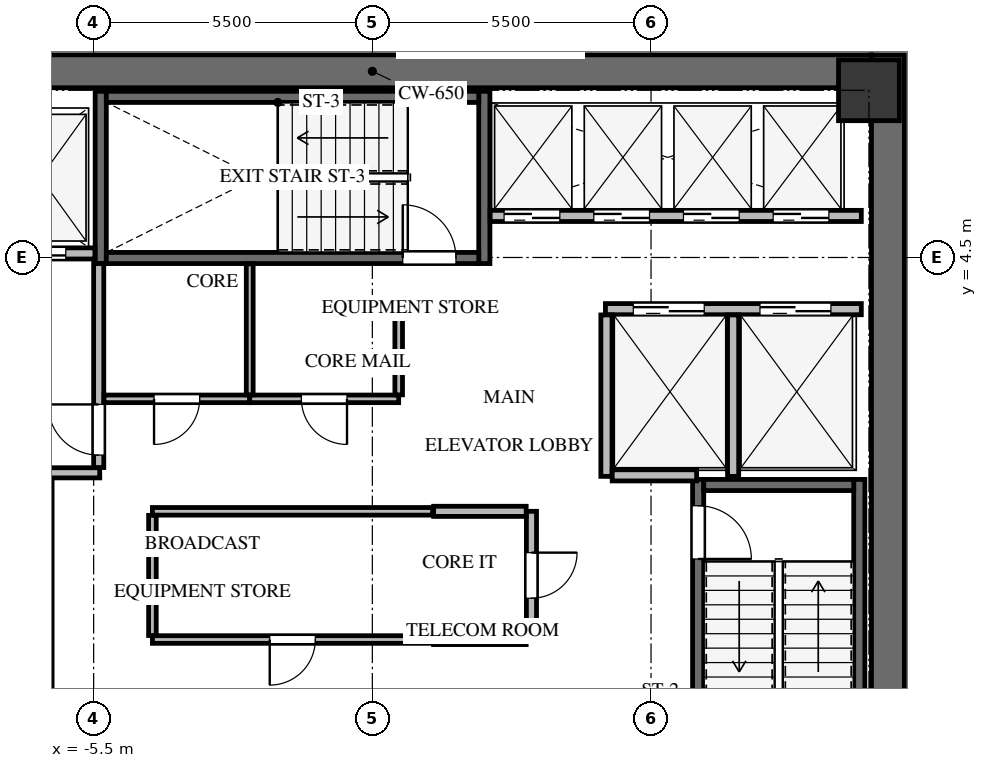
"""IFC4 building model, lengths in metres.
Left out: names, types, materials, properties, quantities, classifications, styles, units other than length and angle.
Written with IfcOpenShell. Run it as: python <this file> out.ifc"""

import sys

from ifc_helpers import new_model, si_unit, direction, frame, frame_2d, origin, origin_2d, place, context, subcontext, project, spatial, rectangle, extrude, source, transform, mapped, element, fill, save


model = new_model("IFC4")
c1 = context("Model", 3, precision=1e-05, world=origin(), true_north=direction((0.0, 1.0)))
c2 = subcontext(c1, "Body", "Model", "MODEL_VIEW")
j1 = project(units=[si_unit("LENGTHUNIT", "METRE"), si_unit("PLANEANGLEUNIT", "RADIAN")], contexts=[c1])
p1 = place(None, origin())
s1 = spatial("IfcSite", under=j1, at=p1, CompositionType="ELEMENT")
p2 = place(p1, origin())
s2 = spatial("IfcBuilding", under=s1, at=p2, CompositionType="ELEMENT")
p3 = place(p2, frame((0.0, 0.0, 187.0)))
s3 = spatial("IfcBuildingStorey", under=s2, at=p3, CompositionType="ELEMENT", Elevation=187.0)
p4 = place(p3, frame((10.175, -8.5, 0.0), z_axis=(0.0, 0.0, 1.0), x_axis=(0.0, 1.0, 0.0)))
e1 = element("IfcWall", 1, at=p4, inside=s3, PredefinedType="SHEAR", context=c2, shape_type="SweptSolid", body=[
    extrude(rectangle(XDim=17.0, YDim=0.65, at=frame_2d((8.5, 0.0))), origin(), (0.0, 0.0, 1.0), 3.3),
])
p5 = place(p3, frame((-9.85, 8.175, 0.0), z_axis=(0.0, 0.0, 1.0), x_axis=(1.0, 0.0, 0.0)))
e2 = element("IfcWall", 2, at=p5, inside=s3, PredefinedType="SHEAR", context=c2, shape_type="SweptSolid", body=[
    extrude(rectangle(XDim=19.7, YDim=0.65, at=frame_2d((9.85, 0.0))), origin(), (0.0, 0.0, 1.0), 3.3),
])
p6 = place(p3, frame((-6.43, -7.77, -0.24), z_axis=(0.0, 0.0, 1.0), x_axis=(0.0, 1.0, 0.0)))
e3 = element("IfcWall", 3, at=p6, inside=s3, PredefinedType="SHEAR", context=c2, shape_type="SweptSolid", body=[
    extrude(rectangle(XDim=7.89, YDim=0.22, at=frame_2d((3.945, 0.0))), origin(), (0.0, 0.0, 1.0), 3.3),
])
p7 = place(p6, frame((6.32, 0.0, 0.0)))
e4 = element("IfcOpeningElement", 4, at=p7, cuts=e3, PredefinedType="OPENING", context=c2, shape_type="SweptSolid", body=[
    extrude(rectangle(XDim=1.05, YDim=2.15, at=frame_2d((0.525, 1.075))), frame((0.0, 0.12, 0.0), z_axis=(0.0, -1.0, 0.0), x_axis=(1.0, 0.0, 0.0)), (0.0, 0.0, 1.0), 0.24),
])
p8 = place(p3, frame((9.61, -7.77, -0.24), z_axis=(0.0, 0.0, 1.0), x_axis=(0.0, 1.0, 0.0)))
e5 = element("IfcWall", 5, at=p8, inside=s3, PredefinedType="SHEAR", context=c2, shape_type="SweptSolid", body=[
    extrude(rectangle(XDim=7.89, YDim=0.22, at=frame_2d((3.945, 0.0))), origin(), (0.0, 0.0, 1.0), 3.3),
])
p9 = place(p3, frame((6.43, 0.12, -0.24), z_axis=(0.0, 0.0, 1.0), x_axis=(0.0, -1.0, 0.0)))
e6 = element("IfcWall", 6, at=p9, inside=s3, PredefinedType="SHEAR", context=c2, shape_type="SweptSolid", body=[
    extrude(rectangle(XDim=7.89, YDim=0.22, at=frame_2d((3.945, 0.0))), origin(), (0.0, 0.0, 1.0), 3.3),
])
p10 = place(p9, frame((0.52, 0.0, 0.0)))
e7 = element("IfcOpeningElement", 7, at=p10, cuts=e6, PredefinedType="OPENING", context=c2, shape_type="SweptSolid", body=[
    extrude(rectangle(XDim=1.05, YDim=2.15, at=frame_2d((0.525, 1.075))), frame((0.0, 0.12, 0.0), z_axis=(0.0, -1.0, 0.0), x_axis=(1.0, 0.0, 0.0)), (0.0, 0.0, 1.0), 0.24),
])
p11 = place(p3, frame((9.5, 0.01, -0.24), z_axis=(0.0, 0.0, 1.0), x_axis=(-1.0, 0.0, 0.0)))
e8 = element("IfcWall", 8, at=p11, inside=s3, PredefinedType="SHEAR", context=c2, shape_type="SweptSolid", body=[
    extrude(rectangle(XDim=2.96, YDim=0.22, at=frame_2d((1.48, 0.0))), origin(), (0.0, 0.0, 1.0), 3.3),
])
for number, where, z_axis, x_axis in (
    (9, (2.21, 4.38, -0.24), (0.0, 0.0, 1.0), (0.0, 1.0, 0.0)),
    (10, (-5.36, 7.78, -0.24), (0.0, 0.0, 1.0), (0.0, -1.0, 0.0)),
):
    element("IfcWall", number, at=place(p3, frame(where, z_axis=z_axis, x_axis=x_axis)), inside=s3, PredefinedType="SHEAR", context=c2, shape_type="SweptSolid", body=[
        extrude(rectangle(XDim=3.4, YDim=0.22, at=frame_2d((1.7, 0.0))), origin(), (0.0, 0.0, 1.0), 3.3),
    ])
p12 = place(p3, frame((-5.25, 4.49, -0.24), z_axis=(0.0, 0.0, 1.0), x_axis=(1.0, 0.0, 0.0)))
e11 = element("IfcWall", 11, at=p12, inside=s3, PredefinedType="SHEAR", context=c2, shape_type="SweptSolid", body=[
    extrude(rectangle(XDim=7.35, YDim=0.22, at=frame_2d((3.675, 0.0))), origin(), (0.0, 0.0, 1.0), 3.3),
])
p13 = place(p12, frame((5.85, 0.0, 0.0)))
e12 = element("IfcOpeningElement", 12, at=p13, cuts=e11, PredefinedType="OPENING", context=c2, shape_type="SweptSolid", body=[
    extrude(rectangle(XDim=1.05, YDim=2.15, at=frame_2d((0.525, 1.075))), frame((0.0, 0.12, 0.0), z_axis=(0.0, -1.0, 0.0), x_axis=(1.0, 0.0, 0.0)), (0.0, 0.0, 1.0), 0.24),
])
p14 = place(p3, frame((2.1, 7.67, -0.24), z_axis=(0.0, 0.0, 1.0), x_axis=(-1.0, 0.0, 0.0)))
e13 = element("IfcWall", 13, at=p14, inside=s3, PredefinedType="SHEAR", context=c2, shape_type="SweptSolid", body=[
    extrude(rectangle(XDim=7.35, YDim=0.22, at=frame_2d((3.675, 0.0))), origin(), (0.0, 0.0, 1.0), 3.3),
])
m1 = source(origin(), c2, "Body", "SweptSolid", [
    extrude(rectangle(XDim=1.2, YDim=1.2, at=origin_2d()), origin(), (0.0, 0.0, 1.0), 3.3),
])
p15 = place(p3, frame((9.8, 7.8, -0.24), z_axis=(0.0, 0.0, 1.0), x_axis=(1.0, 0.0, 0.0)))
e14 = element("IfcColumn", 14, at=p15, inside=s3, PredefinedType="COLUMN", context=c2, shape_type="MappedRepresentation", body=[
    mapped(m1, transform((0.0, 0.0, 0.0), x_axis=(1.0, 0.0, 0.0), y_axis=(0.0, 1.0, 0.0), z_axis=(0.0, 0.0, 1.0), scale=1.0)),
])
p16 = place(p3, frame((-9.65, 4.58, 0.0), z_axis=(0.0, 0.0, 1.0), x_axis=(1.0, 0.0, 0.0)))
e15 = element("IfcWall", 15, at=p16, inside=s3, PredefinedType="SOLIDWALL", context=c2, shape_type="SweptSolid", body=[
    extrude(rectangle(XDim=4.175, YDim=0.22, at=frame_2d((2.087, 0.0))), origin(), (0.0, 0.0, 1.0), 3.045),
])
p17 = place(p16, frame((0.4, 0.0, 0.0)))
e16 = element("IfcOpeningElement", 16, at=p17, cuts=e15, PredefinedType="OPENING", context=c2, shape_type="SweptSolid", body=[
    extrude(rectangle(XDim=1.2, YDim=2.15, at=frame_2d((0.6, 1.075))), frame((0.0, 0.12, 0.0), z_axis=(0.0, -1.0, 0.0), x_axis=(1.0, 0.0, 0.0)), (0.0, 0.0, 1.0), 0.24),
])
p18 = place(p16, frame((2.4, 0.0, 0.0)))
e17 = element("IfcOpeningElement", 17, at=p18, cuts=e15, PredefinedType="OPENING", context=c2, shape_type="SweptSolid", body=[
    extrude(rectangle(XDim=1.2, YDim=2.15, at=frame_2d((0.6, 1.075))), frame((0.0, 0.12, 0.0), z_axis=(0.0, -1.0, 0.0), x_axis=(1.0, 0.0, 0.0)), (0.0, 0.0, 1.0), 0.24),
])
p19 = place(p3, frame((-9.65, 0.25, 0.0), z_axis=(0.0, 0.0, 1.0), x_axis=(1.0, 0.0, 0.0)))
e18 = element("IfcWall", 18, at=p19, inside=s3, PredefinedType="SOLIDWALL", context=c2, shape_type="SweptSolid", body=[
    extrude(rectangle(XDim=4.27, YDim=0.2, at=frame_2d((2.135, 0.0))), origin(), (0.0, 0.0, 1.0), 3.045),
])
p20 = place(p3, frame((-5.4, 0.354, 0.0), z_axis=(0.0, 0.0, 1.0), x_axis=(0.0, 1.0, 0.0)))
e19 = element("IfcWall", 19, at=p20, inside=s3, PredefinedType="SOLIDWALL", context=c2, shape_type="SweptSolid", body=[
    extrude(rectangle(XDim=4.026, YDim=0.2, at=frame_2d((2.013, 0.0))), origin(), (0.0, 0.0, 1.0), 3.045),
])
p21 = place(p20, frame((0.246, 0.0, 0.0)))
e20 = element("IfcOpeningElement", 20, at=p21, cuts=e19, PredefinedType="OPENING", context=c2, shape_type="SweptSolid", body=[
    extrude(rectangle(XDim=1.0, YDim=2.15, at=frame_2d((0.5, 1.075))), frame((0.0, 0.11, 0.0), z_axis=(0.0, -1.0, 0.0), x_axis=(1.0, 0.0, 0.0)), (0.0, 0.0, 1.0), 0.22),
])
p22 = place(p3, frame((4.6, 3.48, 0.0), z_axis=(0.0, 0.0, 1.0), x_axis=(1.0, 0.0, 0.0)))
e21 = element("IfcWall", 21, at=p22, inside=s3, PredefinedType="SOLIDWALL", context=c2, shape_type="SweptSolid", body=[
    extrude(rectangle(XDim=5.05, YDim=0.22, at=frame_2d((2.525, 0.0))), origin(), (0.0, 0.0, 1.0), 3.045),
])
p23 = place(p22, frame((0.55, 0.0, 0.0)))
e22 = element("IfcOpeningElement", 22, at=p23, cuts=e21, PredefinedType="OPENING", context=c2, shape_type="SweptSolid", body=[
    extrude(rectangle(XDim=1.4, YDim=2.15, at=frame_2d((0.7, 1.075))), frame((0.0, 0.12, 0.0), z_axis=(0.0, -1.0, 0.0), x_axis=(1.0, 0.0, 0.0)), (0.0, 0.0, 1.0), 0.24),
])
p24 = place(p22, frame((3.05, 0.0, 0.0)))
e23 = element("IfcOpeningElement", 23, at=p24, cuts=e21, PredefinedType="OPENING", context=c2, shape_type="SweptSolid", body=[
    extrude(rectangle(XDim=1.4, YDim=2.15, at=frame_2d((0.7, 1.075))), frame((0.0, 0.12, 0.0), z_axis=(0.0, -1.0, 0.0), x_axis=(1.0, 0.0, 0.0)), (0.0, 0.0, 1.0), 0.24),
])
for number, where, z_axis, x_axis in (
    (24, (4.62, 0.18, 0.0), (0.0, 0.0, 1.0), (0.0, 1.0, 0.0)),
    (25, (7.12, 0.18, 0.0), (0.0, 0.0, 1.0), (0.0, 1.0, 0.0)),
):
    element("IfcWall", number, at=place(p3, frame(where, z_axis=z_axis, x_axis=x_axis)), inside=s3, PredefinedType="SOLIDWALL", context=c2, shape_type="SweptSolid", body=[
        extrude(rectangle(XDim=3.186, YDim=0.22, at=frame_2d((1.593, 0.0))), origin(), (0.0, 0.0, 1.0), 3.045),
    ])
p25 = place(p3, frame((4.734, 0.2, 0.0), z_axis=(0.0, 0.0, 1.0), x_axis=(1.0, 0.0, 0.0)))
e26 = element("IfcWall", 26, at=p25, inside=s3, PredefinedType="SOLIDWALL", context=c2, shape_type="SweptSolid", body=[
    extrude(rectangle(XDim=1.666, YDim=0.22, at=frame_2d((0.833, 0.0))), origin(), (0.0, 0.0, 1.0), 3.045),
])
p26 = place(p3, frame((2.325, 5.32, 0.0), z_axis=(0.0, 0.0, 1.0), x_axis=(1.0, 0.0, 0.0)))
e27 = element("IfcWall", 27, at=p26, inside=s3, PredefinedType="SOLIDWALL", context=c2, shape_type="SweptSolid", body=[
    extrude(rectangle(XDim=7.325, YDim=0.22, at=frame_2d((3.663, 0.0))), origin(), (0.0, 0.0, 1.0), 3.045),
])
p27 = place(p26, frame((0.275, 0.0, 0.0)))
e28 = element("IfcOpeningElement", 28, at=p27, cuts=e27, PredefinedType="OPENING", context=c2, shape_type="SweptSolid", body=[
    extrude(rectangle(XDim=1.1, YDim=2.15, at=frame_2d((0.55, 1.075))), frame((0.0, 0.12, 0.0), z_axis=(0.0, -1.0, 0.0), x_axis=(1.0, 0.0, 0.0)), (0.0, 0.0, 1.0), 0.24),
])
p28 = place(p26, frame((2.045, 0.0, 0.0)))
e29 = element("IfcOpeningElement", 29, at=p28, cuts=e27, PredefinedType="OPENING", context=c2, shape_type="SweptSolid", body=[
    extrude(rectangle(XDim=1.1, YDim=2.15, at=frame_2d((0.55, 1.075))), frame((0.0, 0.12, 0.0), z_axis=(0.0, -1.0, 0.0), x_axis=(1.0, 0.0, 0.0)), (0.0, 0.0, 1.0), 0.24),
])
p29 = place(p26, frame((3.815, 0.0, 0.0)))
e30 = element("IfcOpeningElement", 30, at=p29, cuts=e27, PredefinedType="OPENING", context=c2, shape_type="SweptSolid", body=[
    extrude(rectangle(XDim=1.1, YDim=2.15, at=frame_2d((0.55, 1.075))), frame((0.0, 0.12, 0.0), z_axis=(0.0, -1.0, 0.0), x_axis=(1.0, 0.0, 0.0)), (0.0, 0.0, 1.0), 0.24),
])
p30 = place(p26, frame((5.585, 0.0, 0.0)))
e31 = element("IfcOpeningElement", 31, at=p30, cuts=e27, PredefinedType="OPENING", context=c2, shape_type="SweptSolid", body=[
    extrude(rectangle(XDim=1.1, YDim=2.15, at=frame_2d((0.55, 1.075))), frame((0.0, 0.12, 0.0), z_axis=(0.0, -1.0, 0.0), x_axis=(1.0, 0.0, 0.0)), (0.0, 0.0, 1.0), 0.24),
])
p31 = place(p3, frame((1.19, -3.04, 0.0), z_axis=(0.0, 0.0, 1.0), x_axis=(-1.0, 0.0, 0.0)))
e32 = element("IfcWall", 32, at=p31, inside=s3, PredefinedType="PARTITIONING", context=c2, shape_type="SweptSolid", body=[
    extrude(rectangle(XDim=5.53, YDim=0.15, at=frame_2d((2.765, 0.0))), origin(), (0.0, 0.0, 1.0), 3.045),
])
p32 = place(p31, frame((2.315, 0.0, 0.0)))
e33 = element("IfcOpeningElement", 33, at=p32, cuts=e32, PredefinedType="OPENING", context=c2, shape_type="SweptSolid", body=[
    extrude(rectangle(XDim=0.9, YDim=2.05, at=frame_2d((0.45, 1.025))), frame((0.0, 0.085, 0.0), z_axis=(0.0, -1.0, 0.0), x_axis=(1.0, 0.0, 0.0)), (0.0, 0.0, 1.0), 0.17),
])
p33 = place(p3, frame((-4.34, -0.51, 0.0), z_axis=(0.0, 0.0, 1.0), x_axis=(1.0, 0.0, 0.0)))
e34 = element("IfcWall", 34, at=p33, inside=s3, PredefinedType="PARTITIONING", context=c2, shape_type="SweptSolid", body=[
    extrude(rectangle(XDim=5.53, YDim=0.15, at=frame_2d((2.765, 0.0))), origin(), (0.0, 0.0, 1.0), 3.045),
])
p34 = place(p3, frame((-4.34, -2.961, 0.0), z_axis=(0.0, 0.0, 1.0), x_axis=(0.0, 1.0, 0.0)))
e35 = element("IfcWall", 35, at=p34, inside=s3, PredefinedType="PARTITIONING", context=c2, shape_type="SweptSolid", body=[
    extrude(rectangle(XDim=2.372, YDim=0.15, at=frame_2d((1.186, 0.0))), origin(), (0.0, 0.0, 1.0), 3.045),
])
p35 = place(p3, frame((3.14, -0.51, 0.0), z_axis=(0.0, 0.0, 1.0), x_axis=(0.0, -1.0, 0.0)))
e36 = element("IfcWall", 36, at=p35, inside=s3, PredefinedType="SOLIDWALL", context=c2, shape_type="SweptSolid", body=[
    extrude(rectangle(XDim=2.53, YDim=0.2, at=frame_2d((1.265, 0.0))), origin(), (0.0, 0.0, 1.0), 3.045),
])
p36 = place(p35, frame((0.815, 0.0, 0.0)))
e37 = element("IfcOpeningElement", 37, at=p36, cuts=e36, PredefinedType="OPENING", context=c2, shape_type="SweptSolid", body=[
    extrude(rectangle(XDim=0.9, YDim=2.05, at=frame_2d((0.45, 1.025))), frame((0.0, 0.11, 0.0), z_axis=(0.0, -1.0, 0.0), x_axis=(1.0, 0.0, 0.0)), (0.0, 0.0, 1.0), 0.22),
])
for number, where, z_axis, x_axis in (
    (38, (3.036, -3.04, 0.0), (0.0, 0.0, 1.0), (-1.0, 0.0, 0.0)),
    (39, (1.21, -0.51, 0.0), (0.0, 0.0, 1.0), (1.0, 0.0, 0.0)),
):
    element("IfcWall", number, at=place(p3, frame(where, z_axis=z_axis, x_axis=x_axis)), inside=s3, PredefinedType="SOLIDWALL", context=c2, shape_type="SweptSolid", body=[
        extrude(rectangle(XDim=1.826, YDim=0.2, at=frame_2d((0.913, 0.0))), origin(), (0.0, 0.0, 1.0), 3.045),
    ])
p37 = place(p3, frame((-2.42, 1.71, 0.0), z_axis=(0.0, 0.0, 1.0), x_axis=(-1.0, 0.0, 0.0)))
e40 = element("IfcWall", 40, at=p37, inside=s3, PredefinedType="PARTITIONING", context=c2, shape_type="SweptSolid", body=[
    extrude(rectangle(XDim=2.876, YDim=0.15, at=frame_2d((1.438, 0.0))), origin(), (0.0, 0.0, 1.0), 3.045),
])
p38 = place(p37, frame((0.988, 0.0, 0.0)))
e41 = element("IfcOpeningElement", 41, at=p38, cuts=e40, PredefinedType="OPENING", context=c2, shape_type="SweptSolid", body=[
    extrude(rectangle(XDim=0.9, YDim=2.05, at=frame_2d((0.45, 1.025))), frame((0.0, 0.085, 0.0), z_axis=(0.0, -1.0, 0.0), x_axis=(1.0, 0.0, 0.0)), (0.0, 0.0, 1.0), 0.17),
])
p39 = place(p3, frame((0.52, 1.71, 0.0), z_axis=(0.0, 0.0, 1.0), x_axis=(-1.0, 0.0, 0.0)))
e42 = element("IfcWall", 42, at=p39, inside=s3, PredefinedType="PARTITIONING", context=c2, shape_type="SweptSolid", body=[
    extrude(rectangle(XDim=2.94, YDim=0.15, at=frame_2d((1.47, 0.0))), origin(), (0.0, 0.0, 1.0), 3.045),
])
p40 = place(p39, frame((1.02, 0.0, 0.0)))
e43 = element("IfcOpeningElement", 43, at=p40, cuts=e42, PredefinedType="OPENING", context=c2, shape_type="SweptSolid", body=[
    extrude(rectangle(XDim=0.9, YDim=2.05, at=frame_2d((0.45, 1.025))), frame((0.0, 0.085, 0.0), z_axis=(0.0, -1.0, 0.0), x_axis=(1.0, 0.0, 0.0)), (0.0, 0.0, 1.0), 0.17),
])
p41 = place(p3, frame((0.52, 3.3, 0.0), z_axis=(0.0, 0.0, 1.0), x_axis=(0.0, -1.0, 0.0)))
e44 = element("IfcWall", 44, at=p41, inside=s3, PredefinedType="PARTITIONING", context=c2, shape_type="SweptSolid", body=[
    extrude(rectangle(XDim=1.511, YDim=0.15, at=frame_2d((0.755, 0.0))), origin(), (0.0, 0.0, 1.0), 3.045),
])
p42 = place(p3, frame((-2.42, 4.375, 0.0), z_axis=(0.0, 0.0, 1.0), x_axis=(0.0, -1.0, 0.0)))
e45 = element("IfcWall", 45, at=p42, inside=s3, PredefinedType="PARTITIONING", context=c2, shape_type="SweptSolid", body=[
    extrude(rectangle(XDim=2.586, YDim=0.135, at=frame_2d((1.293, 0.0))), origin(), (0.0, 0.0, 1.0), 3.045),
])
m2 = source(origin(), c2, "Body", "SweptSolid", [
    extrude(rectangle(XDim=1.05, YDim=2.15, at=frame_2d((0.525, 1.075))), frame((0.0, 0.025, 0.0), z_axis=(0.0, -1.0, 0.0), x_axis=(1.0, 0.0, 0.0)), (0.0, 0.0, 1.0), 0.05),
])
p43 = place(p10, origin())
e46 = element("IfcDoor", 46, at=p43, inside=s3, OperationType="SINGLE_SWING_RIGHT", PredefinedType="DOOR", context=c2, shape_type="MappedRepresentation", body=[
    mapped(m2, transform((0.0, 0.0, 0.0), x_axis=(1.0, 0.0, 0.0), y_axis=(0.0, 1.0, 0.0), z_axis=(0.0, 0.0, 1.0), scale=1.0)),
])
fill(e7, e46)
m3 = source(origin(), c2, "Body", "SweptSolid", [
    extrude(rectangle(XDim=1.05, YDim=2.15, at=frame_2d((0.525, 1.075))), frame((0.0, 0.025, 0.0), z_axis=(0.0, -1.0, 0.0), x_axis=(1.0, 0.0, 0.0)), (0.0, 0.0, 1.0), 0.05),
])
p44 = place(p13, origin())
e47 = element("IfcDoor", 47, at=p44, inside=s3, OperationType="SINGLE_SWING_LEFT", PredefinedType="DOOR", context=c2, shape_type="MappedRepresentation", body=[
    mapped(m3, transform((0.0, 0.0, 0.0), x_axis=(1.0, 0.0, 0.0), y_axis=(0.0, 1.0, 0.0), z_axis=(0.0, 0.0, 1.0), scale=1.0)),
])
fill(e12, e47)
m4 = source(origin(), c2, "Body", "SweptSolid", [
    extrude(rectangle(XDim=1.2, YDim=2.15, at=frame_2d((0.6, 1.075))), frame((0.0, 0.025, 0.0), z_axis=(0.0, -1.0, 0.0), x_axis=(1.0, 0.0, 0.0)), (0.0, 0.0, 1.0), 0.05),
])
p45 = place(p18, origin())
e48 = element("IfcDoor", 48, at=p45, inside=s3, OperationType="DOUBLE_DOOR_SLIDING", PredefinedType="DOOR", context=c2, shape_type="MappedRepresentation", body=[
    mapped(m4, transform((0.0, 0.0, 0.0), x_axis=(1.0, 0.0, 0.0), y_axis=(0.0, 1.0, 0.0), z_axis=(0.0, 0.0, 1.0), scale=1.0)),
])
fill(e17, e48)
m5 = source(origin(), c2, "Body", "SweptSolid", [
    extrude(rectangle(XDim=1.0, YDim=2.15, at=frame_2d((0.5, 1.075))), frame((0.0, 0.025, 0.0), z_axis=(0.0, -1.0, 0.0), x_axis=(1.0, 0.0, 0.0)), (0.0, 0.0, 1.0), 0.05),
])
p46 = place(p21, origin())
e49 = element("IfcDoor", 49, at=p46, inside=s3, OperationType="SINGLE_SWING_RIGHT", PredefinedType="DOOR", context=c2, shape_type="MappedRepresentation", body=[
    mapped(m5, transform((0.0, 0.0, 0.0), x_axis=(1.0, 0.0, 0.0), y_axis=(0.0, 1.0, 0.0), z_axis=(0.0, 0.0, 1.0), scale=1.0)),
])
fill(e20, e49)
m6 = source(origin(), c2, "Body", "SweptSolid", [
    extrude(rectangle(XDim=1.4, YDim=2.15, at=frame_2d((0.7, 1.075))), frame((0.0, 0.025, 0.0), z_axis=(0.0, -1.0, 0.0), x_axis=(1.0, 0.0, 0.0)), (0.0, 0.0, 1.0), 0.05),
])
p47 = place(p23, origin())
e50 = element("IfcDoor", 50, at=p47, inside=s3, OperationType="DOUBLE_DOOR_SLIDING", PredefinedType="DOOR", context=c2, shape_type="MappedRepresentation", body=[
    mapped(m6, transform((0.0, 0.0, 0.0), x_axis=(1.0, 0.0, 0.0), y_axis=(0.0, 1.0, 0.0), z_axis=(0.0, 0.0, 1.0), scale=1.0)),
])
fill(e22, e50)
p48 = place(p24, origin())
e51 = element("IfcDoor", 51, at=p48, inside=s3, OperationType="DOUBLE_DOOR_SLIDING", PredefinedType="DOOR", context=c2, shape_type="MappedRepresentation", body=[
    mapped(m6, transform((0.0, 0.0, 0.0), x_axis=(1.0, 0.0, 0.0), y_axis=(0.0, 1.0, 0.0), z_axis=(0.0, 0.0, 1.0), scale=1.0)),
])
fill(e23, e51)
m7 = source(origin(), c2, "Body", "SweptSolid", [
    extrude(rectangle(XDim=1.1, YDim=2.15, at=frame_2d((0.55, 1.075))), frame((0.0, 0.025, 0.0), z_axis=(0.0, -1.0, 0.0), x_axis=(1.0, 0.0, 0.0)), (0.0, 0.0, 1.0), 0.05),
])
p49 = place(p27, origin())
e52 = element("IfcDoor", 52, at=p49, inside=s3, OperationType="DOUBLE_DOOR_SLIDING", PredefinedType="DOOR", context=c2, shape_type="MappedRepresentation", body=[
    mapped(m7, transform((0.0, 0.0, 0.0), x_axis=(1.0, 0.0, 0.0), y_axis=(0.0, 1.0, 0.0), z_axis=(0.0, 0.0, 1.0), scale=1.0)),
])
fill(e28, e52)
p50 = place(p28, origin())
e53 = element("IfcDoor", 53, at=p50, inside=s3, OperationType="DOUBLE_DOOR_SLIDING", PredefinedType="DOOR", context=c2, shape_type="MappedRepresentation", body=[
    mapped(m7, transform((0.0, 0.0, 0.0), x_axis=(1.0, 0.0, 0.0), y_axis=(0.0, 1.0, 0.0), z_axis=(0.0, 0.0, 1.0), scale=1.0)),
])
fill(e29, e53)
p51 = place(p29, origin())
e54 = element("IfcDoor", 54, at=p51, inside=s3, OperationType="DOUBLE_DOOR_SLIDING", PredefinedType="DOOR", context=c2, shape_type="MappedRepresentation", body=[
    mapped(m7, transform((0.0, 0.0, 0.0), x_axis=(1.0, 0.0, 0.0), y_axis=(0.0, 1.0, 0.0), z_axis=(0.0, 0.0, 1.0), scale=1.0)),
])
fill(e30, e54)
p52 = place(p30, origin())
e55 = element("IfcDoor", 55, at=p52, inside=s3, OperationType="DOUBLE_DOOR_SLIDING", PredefinedType="DOOR", context=c2, shape_type="MappedRepresentation", body=[
    mapped(m7, transform((0.0, 0.0, 0.0), x_axis=(1.0, 0.0, 0.0), y_axis=(0.0, 1.0, 0.0), z_axis=(0.0, 0.0, 1.0), scale=1.0)),
])
fill(e31, e55)
m8 = source(origin(), c2, "Body", "SweptSolid", [
    extrude(rectangle(XDim=0.9, YDim=2.05, at=frame_2d((0.45, 1.025))), frame((0.0, 0.025, 0.0), z_axis=(0.0, -1.0, 0.0), x_axis=(1.0, 0.0, 0.0)), (0.0, 0.0, 1.0), 0.05),
])
p53 = place(p32, origin())
e56 = element("IfcDoor", 56, at=p53, inside=s3, OperationType="SINGLE_SWING_RIGHT", PredefinedType="DOOR", context=c2, shape_type="MappedRepresentation", body=[
    mapped(m8, transform((0.0, 0.0, 0.0), x_axis=(1.0, 0.0, 0.0), y_axis=(0.0, 1.0, 0.0), z_axis=(0.0, 0.0, 1.0), scale=1.0)),
])
fill(e33, e56)
m9 = source(origin(), c2, "Body", "SweptSolid", [
    extrude(rectangle(XDim=0.9, YDim=2.05, at=frame_2d((0.45, 1.025))), frame((0.0, 0.025, 0.0), z_axis=(0.0, -1.0, 0.0), x_axis=(1.0, 0.0, 0.0)), (0.0, 0.0, 1.0), 0.05),
])
p54 = place(p36, origin())
e57 = element("IfcDoor", 57, at=p54, inside=s3, OperationType="SINGLE_SWING_LEFT", PredefinedType="DOOR", context=c2, shape_type="MappedRepresentation", body=[
    mapped(m9, transform((0.0, 0.0, 0.0), x_axis=(1.0, 0.0, 0.0), y_axis=(0.0, 1.0, 0.0), z_axis=(0.0, 0.0, 1.0), scale=1.0)),
])
fill(e37, e57)
p55 = place(p38, origin())
e58 = element("IfcDoor", 58, at=p55, inside=s3, OperationType="SINGLE_SWING_RIGHT", PredefinedType="DOOR", context=c2, shape_type="MappedRepresentation", body=[
    mapped(m8, transform((0.0, 0.0, 0.0), x_axis=(1.0, 0.0, 0.0), y_axis=(0.0, 1.0, 0.0), z_axis=(0.0, 0.0, 1.0), scale=1.0)),
])
fill(e41, e58)
p56 = place(p40, origin())
e59 = element("IfcDoor", 59, at=p56, inside=s3, OperationType="SINGLE_SWING_LEFT", PredefinedType="DOOR", context=c2, shape_type="MappedRepresentation", body=[
    mapped(m9, transform((0.0, 0.0, 0.0), x_axis=(1.0, 0.0, 0.0), y_axis=(0.0, 1.0, 0.0), z_axis=(0.0, 0.0, 1.0), scale=1.0)),
])
fill(e43, e59)
save(model, sys.argv[1])
